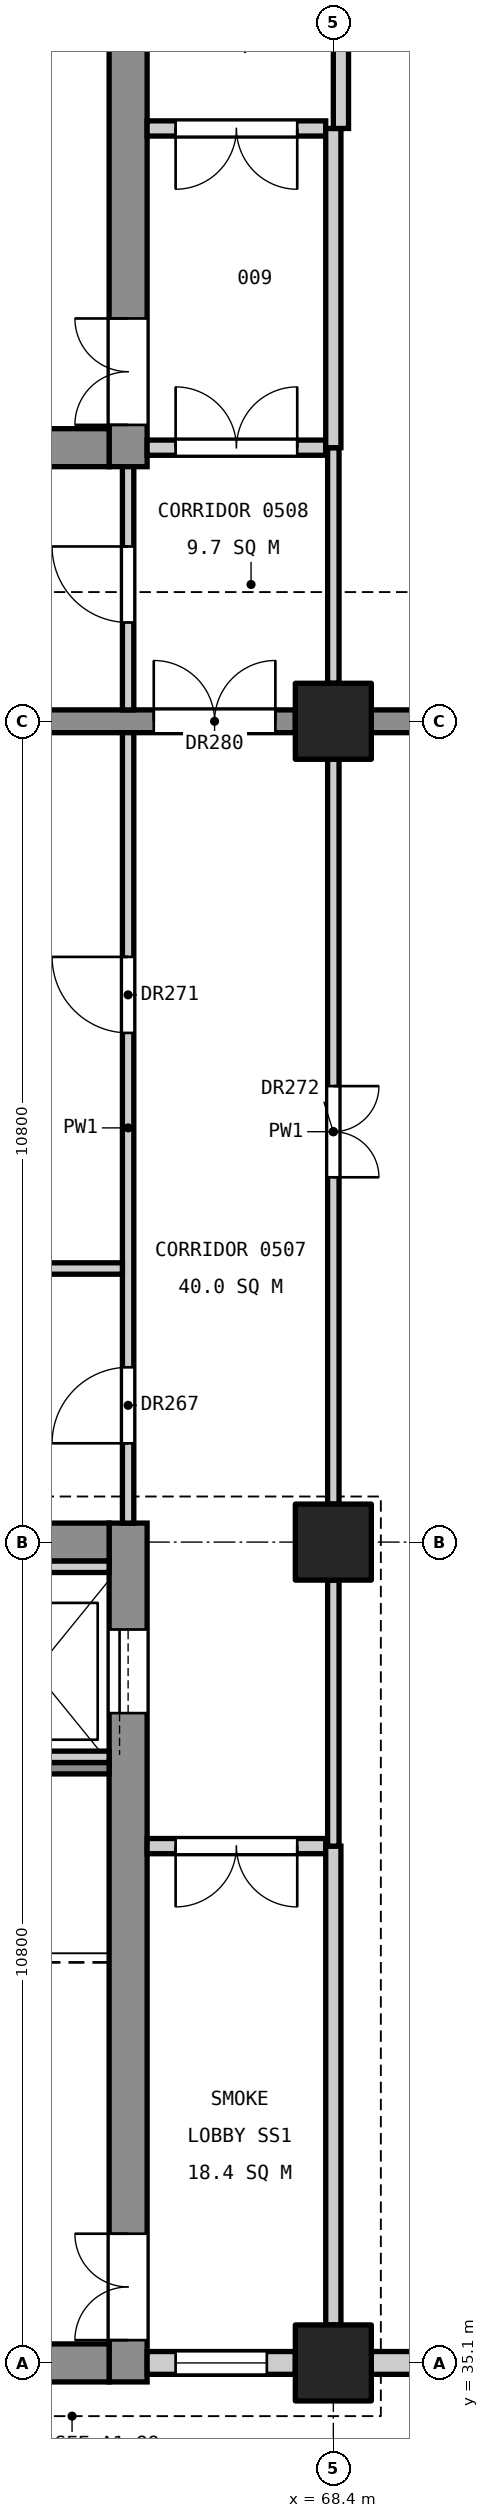
"""IFC4 building model, lengths in metres.
Left out: names, types, materials, properties, quantities, classifications, styles, units other than length and angle.
Written with IfcOpenShell. Run it as: python <this file> out.ifc"""

import sys

from ifc_helpers import new_model, si_unit, direction, frame, frame_2d, origin, origin_2d, place, context, subcontext, project, spatial, rectangle, extrude, element, fill, save


model = new_model("IFC4")
c1 = context("Model", 3, precision=1e-05, world=origin(), true_north=direction((0.0, 1.0)))
c2 = subcontext(c1, "Body", "Model", "MODEL_VIEW")
j1 = project(units=[si_unit("LENGTHUNIT", "METRE"), si_unit("PLANEANGLEUNIT", "RADIAN")], contexts=[c1])
p1 = place(None, origin())
s1 = spatial("IfcSite", under=j1, at=p1, CompositionType="ELEMENT")
p2 = place(p1, origin())
s2 = spatial("IfcBuilding", under=s1, at=p2, CompositionType="ELEMENT")
p3 = place(p2, frame((0.0, 0.0, 27.0)))
s3 = spatial("IfcBuildingStorey", under=s2, at=p3, CompositionType="ELEMENT", Elevation=27.0)
for number, where, z_axis, x_axis in (
    (1, (68.4, 35.1, 0.0), (0.0, 0.0, 1.0), (1.0, 0.0, 0.0)),
    (2, (68.4, 45.9, 0.0), (0.0, 0.0, 1.0), (1.0, 0.0, 0.0)),
    (3, (68.4, 56.7, 0.0), (0.0, 0.0, 1.0), (1.0, 0.0, 0.0)),
):
    element("IfcColumn", number, at=place(p3, frame(where, z_axis=z_axis, x_axis=x_axis)), inside=s3, PredefinedType="COLUMN", context=c2, shape_type="SweptSolid", body=[
        extrude(rectangle(XDim=1.0, YDim=1.0, at=origin_2d()), origin(), (0.0, 0.0, 1.0), 4.8),
    ])
p4 = place(p3, frame((65.7, 34.85, 0.0), z_axis=(0.0, 0.0, 1.0), x_axis=(0.0, 1.0, 0.0)))
e4 = element("IfcWall", 4, at=p4, inside=s3, PredefinedType="SHEAR", context=c2, shape_type="SweptSolid", body=[
    extrude(rectangle(XDim=11.3, YDim=0.5, at=frame_2d((5.65, 0.0))), origin(), (0.0, 0.0, 1.0), 4.55),
])
p5 = place(p4, frame((0.55, 0.0, 0.0)))
e5 = element("IfcOpeningElement", 5, at=p5, cuts=e4, PredefinedType="OPENING", context=c2, shape_type="SweptSolid", body=[
    extrude(rectangle(XDim=1.4, YDim=2.1, at=frame_2d((0.7, 1.05))), frame((0.0, 0.26, 0.0), z_axis=(0.0, -1.0, 0.0), x_axis=(1.0, 0.0, 0.0)), (0.0, 0.0, 1.0), 0.52),
])
p6 = place(p4, frame((8.8, 0.0, 0.0)))
e6 = element("IfcOpeningElement", 6, at=p6, cuts=e4, PredefinedType="OPENING", context=c2, shape_type="SweptSolid", body=[
    extrude(rectangle(XDim=1.1, YDim=2.1, at=frame_2d((0.55, 1.05))), frame((0.0, 0.26, 0.0), z_axis=(0.0, -1.0, 0.0), x_axis=(1.0, 0.0, 0.0)), (0.0, 0.0, 1.0), 0.52),
])
p7 = place(p3, frame((61.45, 35.1, 0.0), z_axis=(0.0, 0.0, 1.0), x_axis=(1.0, 0.0, 0.0)))
e7 = element("IfcWall", 7, at=p7, inside=s3, PredefinedType="SHEAR", context=c2, shape_type="SweptSolid", body=[
    extrude(rectangle(XDim=4.0, YDim=0.5, at=frame_2d((2.0, 0.0))), origin(), (0.0, 0.0, 1.0), 4.55),
])
p8 = place(p7, frame((1.4, 0.0, 3.4)))
e8 = element("IfcOpeningElement", 8, at=p8, cuts=e7, PredefinedType="OPENING", context=c2, shape_type="SweptSolid", body=[
    extrude(rectangle(XDim=1.2, YDim=0.9, at=frame_2d((0.6, 0.45))), frame((0.0, 0.26, 0.0), z_axis=(0.0, -1.0, 0.0), x_axis=(1.0, 0.0, 0.0)), (0.0, 0.0, 1.0), 0.52),
])
p9 = place(p3, frame((61.45, 45.9, 0.0), z_axis=(0.0, 0.0, 1.0), x_axis=(1.0, 0.0, 0.0)))
e9 = element("IfcWall", 9, at=p9, inside=s3, PredefinedType="SHEAR", context=c2, shape_type="SweptSolid", body=[
    extrude(rectangle(XDim=4.0, YDim=0.5, at=frame_2d((2.0, 0.0))), origin(), (0.0, 0.0, 1.0), 4.55),
])
p10 = place(p3, frame((65.7, 60.05, 0.0), z_axis=(0.0, 0.0, 1.0), x_axis=(0.0, 1.0, 0.0)))
e10 = element("IfcWall", 10, at=p10, inside=s3, PredefinedType="SHEAR", context=c2, shape_type="SweptSolid", body=[
    extrude(rectangle(XDim=14.9, YDim=0.5, at=frame_2d((7.45, 0.0))), origin(), (0.0, 0.0, 1.0), 4.55),
])
p11 = place(p10, frame((0.55, 0.0, 0.0)))
e11 = element("IfcOpeningElement", 11, at=p11, cuts=e10, PredefinedType="OPENING", context=c2, shape_type="SweptSolid", body=[
    extrude(rectangle(XDim=1.4, YDim=2.1, at=frame_2d((0.7, 1.05))), frame((0.0, 0.26, 0.0), z_axis=(0.0, -1.0, 0.0), x_axis=(1.0, 0.0, 0.0)), (0.0, 0.0, 1.0), 0.52),
])
p12 = place(p10, frame((8.85, 0.0, 0.0)))
e12 = element("IfcOpeningElement", 12, at=p12, cuts=e10, PredefinedType="OPENING", context=c2, shape_type="SweptSolid", body=[
    extrude(rectangle(XDim=1.1, YDim=2.1, at=frame_2d((0.55, 1.05))), frame((0.0, 0.26, 0.0), z_axis=(0.0, -1.0, 0.0), x_axis=(1.0, 0.0, 0.0)), (0.0, 0.0, 1.0), 0.52),
])
p13 = place(p10, frame((11.4, 0.0, 0.0)))
e13 = element("IfcOpeningElement", 13, at=p13, cuts=e10, PredefinedType="OPENING", context=c2, shape_type="SweptSolid", body=[
    extrude(rectangle(XDim=1.1, YDim=2.1, at=frame_2d((0.55, 1.05))), frame((0.0, 0.26, 0.0), z_axis=(0.0, -1.0, 0.0), x_axis=(1.0, 0.0, 0.0)), (0.0, 0.0, 1.0), 0.52),
])
p14 = place(p3, frame((61.45, 60.3, 0.0), z_axis=(0.0, 0.0, 1.0), x_axis=(1.0, 0.0, 0.0)))
e14 = element("IfcWall", 14, at=p14, inside=s3, PredefinedType="SHEAR", context=c2, shape_type="SweptSolid", body=[
    extrude(rectangle(XDim=4.0, YDim=0.5, at=frame_2d((2.0, 0.0))), origin(), (0.0, 0.0, 1.0), 4.55),
])
p15 = place(p3, frame((61.7, 56.7, 0.0), z_axis=(0.0, 0.0, 1.0), x_axis=(1.0, 0.0, 0.0)))
e15 = element("IfcWall", 15, at=p15, inside=s3, PredefinedType="SHEAR", context=c2, shape_type="SweptSolid", body=[
    extrude(rectangle(XDim=6.2, YDim=0.3, at=frame_2d((3.1, 0.0))), origin(), (0.0, 0.0, 1.0), 4.55),
])
p16 = place(p15, frame((4.337, 0.0, 0.0)))
e16 = element("IfcOpeningElement", 16, at=p16, cuts=e15, PredefinedType="OPENING", context=c2, shape_type="SweptSolid", body=[
    extrude(rectangle(XDim=1.6, YDim=2.1, at=frame_2d((0.8, 1.05))), frame((0.0, 0.16, 0.0), z_axis=(0.0, -1.0, 0.0), x_axis=(1.0, 0.0, 0.0)), (0.0, 0.0, 1.0), 0.32),
])
p17 = place(p3, frame((68.9, 56.7, 0.0), z_axis=(0.0, 0.0, 1.0), x_axis=(1.0, 0.0, 0.0)))
e17 = element("IfcWall", 17, at=p17, inside=s3, PredefinedType="SHEAR", context=c2, shape_type="SweptSolid", body=[
    extrude(rectangle(XDim=9.8, YDim=0.3, at=frame_2d((4.9, 0.0))), origin(), (0.0, 0.0, 1.0), 4.55),
])
p18 = place(p3, frame((61.45, 42.925, 0.0), z_axis=(0.0, 0.0, 1.0), x_axis=(1.0, 0.0, 0.0)))
e18 = element("IfcWall", 18, at=p18, inside=s3, PredefinedType="SOLIDWALL", context=c2, shape_type="SweptSolid", body=[
    extrude(rectangle(XDim=4.0, YDim=0.15, at=frame_2d((2.0, 0.0))), origin(), (0.0, 0.0, 1.0), 4.55),
])
for number, where, z_axis, x_axis in (
    (19, (63.65, 43.075, 0.0), (0.0, 0.0, 1.0), (1.0, 0.0, 0.0)),
    (20, (63.65, 45.575, 0.0), (0.0, 0.0, 1.0), (1.0, 0.0, 0.0)),
):
    element("IfcWall", number, at=place(p3, frame(where, z_axis=z_axis, x_axis=x_axis)), inside=s3, PredefinedType="SOLIDWALL", context=c2, shape_type="SweptSolid", body=[
        extrude(rectangle(XDim=1.8, YDim=0.15, at=frame_2d((0.9, 0.0))), origin(), (0.0, 0.0, 1.0), 4.8),
    ])
p19 = place(p3, frame((65.95, 35.1, 0.0), z_axis=(0.0, 0.0, 1.0), x_axis=(1.0, 0.0, 0.0)))
e21 = element("IfcWall", 21, at=p19, inside=s3, PredefinedType="STANDARD", context=c2, shape_type="SweptSolid", body=[
    extrude(rectangle(XDim=1.95, YDim=0.3, at=frame_2d((0.975, 0.0))), origin(), (0.0, 0.0, 1.0), 3.85),
])
p20 = place(p19, frame((0.375, 0.0, 0.9)))
e22 = element("IfcOpeningElement", 22, at=p20, cuts=e21, PredefinedType="OPENING", context=c2, shape_type="SweptSolid", body=[
    extrude(rectangle(XDim=1.2, YDim=2.4, at=frame_2d((0.6, 1.2))), frame((0.0, 0.16, 0.0), z_axis=(0.0, -1.0, 0.0), x_axis=(1.0, 0.0, 0.0)), (0.0, 0.0, 1.0), 0.32),
])
p21 = place(p3, frame((68.9, 35.1, 0.0), z_axis=(0.0, 0.0, 1.0), x_axis=(1.0, 0.0, 0.0)))
e23 = element("IfcWall", 23, at=p21, inside=s3, PredefinedType="STANDARD", context=c2, shape_type="SweptSolid", body=[
    extrude(rectangle(XDim=9.8, YDim=0.3, at=frame_2d((4.9, 0.0))), origin(), (0.0, 0.0, 1.0), 3.85),
])
p22 = place(p21, frame((0.65, 0.0, 0.9)))
e24 = element("IfcOpeningElement", 24, at=p22, cuts=e23, PredefinedType="OPENING", context=c2, shape_type="SweptSolid", body=[
    extrude(rectangle(XDim=1.8, YDim=2.4, at=frame_2d((0.9, 1.2))), frame((0.0, 0.16, 0.0), z_axis=(0.0, -1.0, 0.0), x_axis=(1.0, 0.0, 0.0)), (0.0, 0.0, 1.0), 0.32),
])
p23 = place(p21, frame((4.525, 0.0, 0.8)))
e25 = element("IfcOpeningElement", 25, at=p23, cuts=e23, PredefinedType="OPENING", context=c2, shape_type="SweptSolid", body=[
    extrude(rectangle(XDim=0.75, YDim=1.2, at=frame_2d((0.375, 0.6))), frame((0.0, 0.16, 0.0), z_axis=(0.0, -1.0, 0.0), x_axis=(1.0, 0.0, 0.0)), (0.0, 0.0, 1.0), 0.32),
])
p24 = place(p21, frame((7.35, 0.0, 0.9)))
e26 = element("IfcOpeningElement", 26, at=p24, cuts=e23, PredefinedType="OPENING", context=c2, shape_type="SweptSolid", body=[
    extrude(rectangle(XDim=1.8, YDim=2.4, at=frame_2d((0.9, 1.2))), frame((0.0, 0.16, 0.0), z_axis=(0.0, -1.0, 0.0), x_axis=(1.0, 0.0, 0.0)), (0.0, 0.0, 1.0), 0.32),
])
p25 = place(p3, frame((65.7, 46.15, 0.0), z_axis=(0.0, 0.0, 1.0), x_axis=(0.0, 1.0, 0.0)))
e27 = element("IfcWall", 27, at=p25, inside=s3, PredefinedType="PARTITIONING", context=c2, shape_type="SweptSolid", body=[
    extrude(rectangle(XDim=10.4, YDim=0.15, at=frame_2d((5.2, 0.0))), origin(), (0.0, 0.0, 1.0), 3.55),
])
p26 = place(p25, frame((1.05, 0.0, 0.0)))
e28 = element("IfcOpeningElement", 28, at=p26, cuts=e27, PredefinedType="OPENING", context=c2, shape_type="SweptSolid", body=[
    extrude(rectangle(XDim=1.0, YDim=2.1, at=frame_2d((0.5, 1.05))), frame((0.0, 0.085, 0.0), z_axis=(0.0, -1.0, 0.0), x_axis=(1.0, 0.0, 0.0)), (0.0, 0.0, 1.0), 0.17),
])
p27 = place(p25, frame((6.45, 0.0, 0.0)))
e29 = element("IfcOpeningElement", 29, at=p27, cuts=e27, PredefinedType="OPENING", context=c2, shape_type="SweptSolid", body=[
    extrude(rectangle(XDim=1.0, YDim=2.1, at=frame_2d((0.5, 1.05))), frame((0.0, 0.085, 0.0), z_axis=(0.0, -1.0, 0.0), x_axis=(1.0, 0.0, 0.0)), (0.0, 0.0, 1.0), 0.17),
])
p28 = place(p3, frame((65.7, 56.85, 0.0), z_axis=(0.0, 0.0, 1.0), x_axis=(0.0, 1.0, 0.0)))
e30 = element("IfcWall", 30, at=p28, inside=s3, PredefinedType="PARTITIONING", context=c2, shape_type="SweptSolid", body=[
    extrude(rectangle(XDim=3.2, YDim=0.15, at=frame_2d((1.6, 0.0))), origin(), (0.0, 0.0, 1.0), 3.55),
])
p29 = place(p28, frame((1.15, 0.0, 0.0)))
e31 = element("IfcOpeningElement", 31, at=p29, cuts=e30, PredefinedType="OPENING", context=c2, shape_type="SweptSolid", body=[
    extrude(rectangle(XDim=1.0, YDim=2.1, at=frame_2d((0.5, 1.05))), frame((0.0, 0.085, 0.0), z_axis=(0.0, -1.0, 0.0), x_axis=(1.0, 0.0, 0.0)), (0.0, 0.0, 1.0), 0.17),
])
p30 = place(p3, frame((61.35, 49.5, 0.0), z_axis=(0.0, 0.0, 1.0), x_axis=(1.0, 0.0, 0.0)))
e32 = element("IfcWall", 32, at=p30, inside=s3, PredefinedType="PARTITIONING", context=c2, shape_type="SweptSolid", body=[
    extrude(rectangle(XDim=4.275, YDim=0.15, at=frame_2d((2.137, 0.0))), origin(), (0.0, 0.0, 1.0), 3.85),
])
p31 = place(p3, frame((65.95, 41.9, 0.0), z_axis=(0.0, 0.0, 1.0), x_axis=(1.0, 0.0, 0.0)))
e33 = element("IfcWall", 33, at=p31, inside=s3, PredefinedType="PARTITIONING", context=c2, shape_type="SweptSolid", body=[
    extrude(rectangle(XDim=2.35, YDim=0.2, at=frame_2d((1.175, 0.0))), origin(), (0.0, 0.0, 1.0), 3.55),
])
p32 = place(p31, frame((0.375, 0.0, 0.0)))
e34 = element("IfcOpeningElement", 34, at=p32, cuts=e33, PredefinedType="OPENING", context=c2, shape_type="SweptSolid", body=[
    extrude(rectangle(XDim=1.6, YDim=2.1, at=frame_2d((0.8, 1.05))), frame((0.0, 0.11, 0.0), z_axis=(0.0, -1.0, 0.0), x_axis=(1.0, 0.0, 0.0)), (0.0, 0.0, 1.0), 0.22),
])
p33 = place(p3, frame((65.95, 60.3, 0.0), z_axis=(0.0, 0.0, 1.0), x_axis=(1.0, 0.0, 0.0)))
e35 = element("IfcWall", 35, at=p33, inside=s3, PredefinedType="PARTITIONING", context=c2, shape_type="SweptSolid", body=[
    extrude(rectangle(XDim=2.35, YDim=0.2, at=frame_2d((1.175, 0.0))), origin(), (0.0, 0.0, 1.0), 3.85),
])
p34 = place(p33, frame((0.375, 0.0, 0.0)))
e36 = element("IfcOpeningElement", 36, at=p34, cuts=e35, PredefinedType="OPENING", context=c2, shape_type="SweptSolid", body=[
    extrude(rectangle(XDim=1.6, YDim=2.1, at=frame_2d((0.8, 1.05))), frame((0.0, 0.11, 0.0), z_axis=(0.0, -1.0, 0.0), x_axis=(1.0, 0.0, 0.0)), (0.0, 0.0, 1.0), 0.22),
])
p35 = place(p3, frame((65.95, 64.5, 0.0), z_axis=(0.0, 0.0, 1.0), x_axis=(1.0, 0.0, 0.0)))
e37 = element("IfcWall", 37, at=p35, inside=s3, PredefinedType="PARTITIONING", context=c2, shape_type="SweptSolid", body=[
    extrude(rectangle(XDim=2.35, YDim=0.2, at=frame_2d((1.175, 0.0))), origin(), (0.0, 0.0, 1.0), 3.55),
])
p36 = place(p35, frame((0.375, 0.0, 0.0)))
e38 = element("IfcOpeningElement", 38, at=p36, cuts=e37, PredefinedType="OPENING", context=c2, shape_type="SweptSolid", body=[
    extrude(rectangle(XDim=1.6, YDim=2.1, at=frame_2d((0.8, 1.05))), frame((0.0, 0.11, 0.0), z_axis=(0.0, -1.0, 0.0), x_axis=(1.0, 0.0, 0.0)), (0.0, 0.0, 1.0), 0.22),
])
p37 = place(p3, frame((68.4, 35.6, 0.0), z_axis=(0.0, 0.0, 1.0), x_axis=(0.0, 1.0, 0.0)))
e39 = element("IfcWall", 39, at=p37, inside=s3, PredefinedType="PARTITIONING", context=c2, shape_type="SweptSolid", body=[
    extrude(rectangle(XDim=6.3, YDim=0.2, at=frame_2d((3.15, 0.0))), origin(), (0.0, 0.0, 1.0), 3.55),
])
p38 = place(p3, frame((68.4, 41.9, 0.0), z_axis=(0.0, 0.0, 1.0), x_axis=(0.0, 1.0, 0.0)))
e40 = element("IfcWall", 40, at=p38, inside=s3, PredefinedType="PARTITIONING", context=c2, shape_type="SweptSolid", body=[
    extrude(rectangle(XDim=3.5, YDim=0.15, at=frame_2d((1.75, 0.0))), origin(), (0.0, 0.0, 1.0), 3.55),
])
p39 = place(p3, frame((68.4, 46.4, 0.0), z_axis=(0.0, 0.0, 1.0), x_axis=(0.0, 1.0, 0.0)))
e41 = element("IfcWall", 41, at=p39, inside=s3, PredefinedType="PARTITIONING", context=c2, shape_type="SweptSolid", body=[
    extrude(rectangle(XDim=9.8, YDim=0.15, at=frame_2d((4.9, 0.0))), origin(), (0.0, 0.0, 1.0), 3.55),
])
p40 = place(p39, frame((4.3, 0.0, 0.0)))
e42 = element("IfcOpeningElement", 42, at=p40, cuts=e41, PredefinedType="OPENING", context=c2, shape_type="SweptSolid", body=[
    extrude(rectangle(XDim=1.2, YDim=2.1, at=frame_2d((0.6, 1.05))), frame((0.0, 0.085, 0.0), z_axis=(0.0, -1.0, 0.0), x_axis=(1.0, 0.0, 0.0)), (0.0, 0.0, 1.0), 0.17),
])
p41 = place(p3, frame((68.4, 57.2, 0.0), z_axis=(0.0, 0.0, 1.0), x_axis=(0.0, 1.0, 0.0)))
e43 = element("IfcWall", 43, at=p41, inside=s3, PredefinedType="PARTITIONING", context=c2, shape_type="SweptSolid", body=[
    extrude(rectangle(XDim=3.1, YDim=0.15, at=frame_2d((1.55, 0.0))), origin(), (0.0, 0.0, 1.0), 3.55),
])
p42 = place(p3, frame((68.4, 60.3, 0.0), z_axis=(0.0, 0.0, 1.0), x_axis=(0.0, 1.0, 0.0)))
e44 = element("IfcWall", 44, at=p42, inside=s3, PredefinedType="PARTITIONING", context=c2, shape_type="SweptSolid", body=[
    extrude(rectangle(XDim=4.2, YDim=0.2, at=frame_2d((2.1, 0.0))), origin(), (0.0, 0.0, 1.0), 3.55),
])
p43 = place(p3, frame((68.5, 64.5, 0.0), z_axis=(0.0, 0.0, 1.0), x_axis=(0.0, 1.0, 0.0)))
e45 = element("IfcWall", 45, at=p43, inside=s3, PredefinedType="PARTITIONING", context=c2, shape_type="SweptSolid", body=[
    extrude(rectangle(XDim=2.5, YDim=0.2, at=frame_2d((1.25, 0.0))), origin(), (0.0, 0.0, 1.0), 3.55),
])
p44 = place(p5, origin())
e46 = element("IfcDoor", 46, at=p44, inside=s3, OperationType="DOUBLE_DOOR_SINGLE_SWING", PredefinedType="DOOR", context=c2, shape_type="SweptSolid", body=[
    extrude(rectangle(XDim=1.4, YDim=2.1, at=frame_2d((0.7, 1.05))), frame((0.0, 0.025, 0.0), z_axis=(0.0, -1.0, 0.0), x_axis=(1.0, 0.0, 0.0)), (0.0, 0.0, 1.0), 0.05),
])
fill(e5, e46)
p45 = place(p11, origin())
e47 = element("IfcDoor", 47, at=p45, inside=s3, OperationType="DOUBLE_DOOR_SINGLE_SWING", PredefinedType="DOOR", context=c2, shape_type="SweptSolid", body=[
    extrude(rectangle(XDim=1.4, YDim=2.1, at=frame_2d((0.7, 1.05))), frame((0.0, 0.025, 0.0), z_axis=(0.0, -1.0, 0.0), x_axis=(1.0, 0.0, 0.0)), (0.0, 0.0, 1.0), 0.05),
])
fill(e11, e47)
p46 = place(p6, origin())
e48 = element("IfcDoor", 48, at=p46, inside=s3, OperationType="SLIDING_TO_LEFT", PredefinedType="DOOR", context=c2, shape_type="SweptSolid", body=[
    extrude(rectangle(XDim=1.1, YDim=2.1, at=frame_2d((0.55, 1.05))), frame((0.0, 0.025, 0.0), z_axis=(0.0, -1.0, 0.0), x_axis=(1.0, 0.0, 0.0)), (0.0, 0.0, 1.0), 0.05),
])
fill(e6, e48)
p47 = place(p20, origin())
e49 = element("IfcWindow", 49, at=p47, inside=s3, PartitioningType="SINGLE_PANEL", PredefinedType="WINDOW", context=c2, shape_type="SweptSolid", body=[
    extrude(rectangle(XDim=1.2, YDim=2.4, at=frame_2d((0.6, 1.2))), frame((0.0, 0.03, 0.0), z_axis=(0.0, -1.0, 0.0), x_axis=(1.0, 0.0, 0.0)), (0.0, 0.0, 1.0), 0.06),
])
fill(e22, e49)
p48 = place(p26, origin())
e50 = element("IfcDoor", 50, at=p48, inside=s3, OperationType="SINGLE_SWING_LEFT", PredefinedType="DOOR", context=c2, shape_type="SweptSolid", body=[
    extrude(rectangle(XDim=1.0, YDim=2.1, at=frame_2d((0.5, 1.05))), frame((0.0, 0.025, 0.0), z_axis=(0.0, -1.0, 0.0), x_axis=(1.0, 0.0, 0.0)), (0.0, 0.0, 1.0), 0.05),
])
fill(e28, e50)
p49 = place(p29, origin())
e51 = element("IfcDoor", 51, at=p49, inside=s3, OperationType="SINGLE_SWING_RIGHT", PredefinedType="DOOR", context=c2, shape_type="SweptSolid", body=[
    extrude(rectangle(XDim=1.0, YDim=2.1, at=frame_2d((0.5, 1.05))), frame((0.0, 0.025, 0.0), z_axis=(0.0, -1.0, 0.0), x_axis=(1.0, 0.0, 0.0)), (0.0, 0.0, 1.0), 0.05),
])
fill(e31, e51)
p50 = place(p27, origin())
e52 = element("IfcDoor", 52, at=p50, inside=s3, OperationType="SINGLE_SWING_RIGHT", PredefinedType="DOOR", context=c2, shape_type="SweptSolid", body=[
    extrude(rectangle(XDim=1.0, YDim=2.1, at=frame_2d((0.5, 1.05))), frame((0.0, 0.025, 0.0), z_axis=(0.0, -1.0, 0.0), x_axis=(1.0, 0.0, 0.0)), (0.0, 0.0, 1.0), 0.05),
])
fill(e29, e52)
p51 = place(p40, frame((1.2, 0.0, 0.0), z_axis=(0.0, 0.0, 1.0), x_axis=(-1.0, 0.0, 0.0)))
e53 = element("IfcDoor", 53, at=p51, inside=s3, OperationType="DOUBLE_DOOR_SINGLE_SWING", PredefinedType="DOOR", context=c2, shape_type="SweptSolid", body=[
    extrude(rectangle(XDim=1.2, YDim=2.1, at=frame_2d((0.6, 1.05))), frame((0.0, 0.025, 0.0), z_axis=(0.0, -1.0, 0.0), x_axis=(1.0, 0.0, 0.0)), (0.0, 0.0, 1.0), 0.05),
])
fill(e42, e53)
p52 = place(p32, frame((1.6, 0.0, 0.0), z_axis=(0.0, 0.0, 1.0), x_axis=(-1.0, 0.0, 0.0)))
e54 = element("IfcDoor", 54, at=p52, inside=s3, OperationType="DOUBLE_DOOR_SINGLE_SWING", PredefinedType="DOOR", context=c2, shape_type="SweptSolid", body=[
    extrude(rectangle(XDim=1.6, YDim=2.1, at=frame_2d((0.8, 1.05))), frame((0.0, 0.025, 0.0), z_axis=(0.0, -1.0, 0.0), x_axis=(1.0, 0.0, 0.0)), (0.0, 0.0, 1.0), 0.05),
])
fill(e34, e54)
p53 = place(p34, origin())
e55 = element("IfcDoor", 55, at=p53, inside=s3, OperationType="DOUBLE_DOOR_SINGLE_SWING", PredefinedType="DOOR", context=c2, shape_type="SweptSolid", body=[
    extrude(rectangle(XDim=1.6, YDim=2.1, at=frame_2d((0.8, 1.05))), frame((0.0, 0.025, 0.0), z_axis=(0.0, -1.0, 0.0), x_axis=(1.0, 0.0, 0.0)), (0.0, 0.0, 1.0), 0.05),
])
fill(e36, e55)
p54 = place(p36, frame((1.6, 0.0, 0.0), z_axis=(0.0, 0.0, 1.0), x_axis=(-1.0, 0.0, 0.0)))
e56 = element("IfcDoor", 56, at=p54, inside=s3, OperationType="DOUBLE_DOOR_SINGLE_SWING", PredefinedType="DOOR", context=c2, shape_type="SweptSolid", body=[
    extrude(rectangle(XDim=1.6, YDim=2.1, at=frame_2d((0.8, 1.05))), frame((0.0, 0.025, 0.0), z_axis=(0.0, -1.0, 0.0), x_axis=(1.0, 0.0, 0.0)), (0.0, 0.0, 1.0), 0.05),
])
fill(e38, e56)
p55 = place(p16, origin())
e57 = element("IfcDoor", 57, at=p55, inside=s3, OperationType="DOUBLE_DOOR_SINGLE_SWING", PredefinedType="DOOR", context=c2, shape_type="SweptSolid", body=[
    extrude(rectangle(XDim=1.6, YDim=2.1, at=frame_2d((0.8, 1.05))), frame((0.0, 0.025, 0.0), z_axis=(0.0, -1.0, 0.0), x_axis=(1.0, 0.0, 0.0)), (0.0, 0.0, 1.0), 0.05),
])
fill(e16, e57)
save(model, sys.argv[1])
